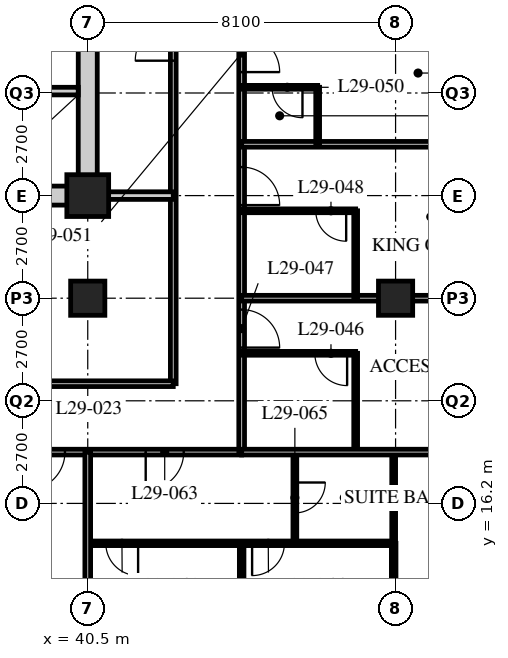
"""IFC4 building model, lengths in metres.
Left out: names, types, materials, properties, quantities, classifications, styles, units other than length and angle.
Written with IfcOpenShell. Run it as: python <this file> out.ifc"""

import sys

from ifc_helpers import new_model, si_unit, direction, frame, frame_2d, origin, origin_2d, place, context, subcontext, project, spatial, rectangle, hollow_rectangle, extrude, element, fill, save


model = new_model("IFC4")
c1 = context("Model", 3, precision=1e-05, world=origin(), true_north=direction((0.0, 1.0)))
c2 = subcontext(c1, "Body", "Model", "MODEL_VIEW")
j1 = project(units=[si_unit("LENGTHUNIT", "METRE"), si_unit("PLANEANGLEUNIT", "RADIAN")], contexts=[c1])
p1 = place(None, origin())
s1 = spatial("IfcSite", under=j1, at=p1, CompositionType="ELEMENT")
p2 = place(p1, origin())
s2 = spatial("IfcBuilding", under=s1, at=p2, CompositionType="ELEMENT")
p3 = place(p2, frame((0.0, 0.0, 117.0)))
s3 = spatial("IfcBuildingStorey", under=s2, at=p3, CompositionType="ELEMENT", Elevation=117.0)
p4 = place(p3, frame((40.5, 21.6, 0.0), z_axis=(0.0, 0.0, 1.0), x_axis=(1.0, 0.0, 0.0)))
e1 = element("IfcColumn", 1, at=p4, inside=s3, PredefinedType="COLUMN", context=c2, shape_type="SweptSolid", body=[
    extrude(hollow_rectangle(XDim=0.9, YDim=0.9, WallThickness=0.09, at=origin_2d()), origin(), (0.0, 0.0, 1.0), 3.4),
])
p5 = place(p3, frame((40.5, 24.3, 0.0), z_axis=(0.0, 0.0, 1.0), x_axis=(1.0, 0.0, 0.0)))
e2 = element("IfcColumn", 2, at=p5, inside=s3, PredefinedType="COLUMN", context=c2, shape_type="SweptSolid", body=[
    extrude(hollow_rectangle(XDim=1.1, YDim=1.1, WallThickness=0.1, at=origin_2d()), origin(), (0.0, 0.0, 1.0), 3.4),
])
p6 = place(p3, frame((48.6, 21.6, 0.0), z_axis=(0.0, 0.0, 1.0), x_axis=(1.0, 0.0, 0.0)))
e3 = element("IfcColumn", 3, at=p6, inside=s3, PredefinedType="COLUMN", context=c2, shape_type="SweptSolid", body=[
    extrude(hollow_rectangle(XDim=0.9, YDim=0.9, WallThickness=0.09, at=origin_2d()), origin(), (0.0, 0.0, 1.0), 3.4),
])
p7 = place(p3, frame((12.15, 17.55, 0.0), z_axis=(0.0, 0.0, 1.0), x_axis=(1.0, 0.0, 0.0)))
e4 = element("IfcWall", 4, at=p7, inside=s3, PredefinedType="PARTITIONING", context=c2, shape_type="SweptSolid", body=[
    extrude(rectangle(XDim=32.4, YDim=0.15, at=frame_2d((16.2, 0.0))), origin(), (0.0, 0.0, 1.0), 3.19),
])
p8 = place(p7, frame((5.95, 0.0, 0.0)))
e5 = element("IfcOpeningElement", 5, at=p8, cuts=e4, PredefinedType="OPENING", context=c2, shape_type="SweptSolid", body=[
    extrude(rectangle(XDim=1.0, YDim=2.1, at=frame_2d((0.5, 1.05))), frame((0.0, 0.085, 0.0), z_axis=(0.0, -1.0, 0.0), x_axis=(1.0, 0.0, 0.0)), (0.0, 0.0, 1.0), 0.17),
])
p9 = place(p7, frame((17.725, 0.0, 0.0)))
e6 = element("IfcOpeningElement", 6, at=p9, cuts=e4, PredefinedType="OPENING", context=c2, shape_type="SweptSolid", body=[
    extrude(rectangle(XDim=1.0, YDim=2.1, at=frame_2d((0.5, 1.05))), frame((0.0, 0.085, 0.0), z_axis=(0.0, -1.0, 0.0), x_axis=(1.0, 0.0, 0.0)), (0.0, 0.0, 1.0), 0.17),
])
p10 = place(p7, frame((26.75, 0.0, 0.0)))
e7 = element("IfcOpeningElement", 7, at=p10, cuts=e4, PredefinedType="OPENING", context=c2, shape_type="SweptSolid", body=[
    extrude(rectangle(XDim=1.0, YDim=2.1, at=frame_2d((0.5, 1.05))), frame((0.0, 0.085, 0.0), z_axis=(0.0, -1.0, 0.0), x_axis=(1.0, 0.0, 0.0)), (0.0, 0.0, 1.0), 0.17),
])
p11 = place(p7, frame((1.525, 0.0, 0.0)))
e8 = element("IfcOpeningElement", 8, at=p11, cuts=e4, PredefinedType="OPENING", context=c2, shape_type="SweptSolid", body=[
    extrude(rectangle(XDim=1.0, YDim=2.1, at=frame_2d((0.5, 1.05))), frame((0.0, 0.085, 0.0), z_axis=(0.0, -1.0, 0.0), x_axis=(1.0, 0.0, 0.0)), (0.0, 0.0, 1.0), 0.17),
])
p12 = place(p7, frame((29.875, 0.0, 0.0)))
e9 = element("IfcOpeningElement", 9, at=p12, cuts=e4, PredefinedType="OPENING", context=c2, shape_type="SweptSolid", body=[
    extrude(rectangle(XDim=1.0, YDim=2.1, at=frame_2d((0.5, 1.05))), frame((0.0, 0.085, 0.0), z_axis=(0.0, -1.0, 0.0), x_axis=(1.0, 0.0, 0.0)), (0.0, 0.0, 1.0), 0.17),
])
p13 = place(p3, frame((44.55, 17.55, 0.0), z_axis=(0.0, 0.0, 1.0), x_axis=(0.0, 1.0, 0.0)))
e10 = element("IfcWall", 10, at=p13, inside=s3, PredefinedType="PARTITIONING", context=c2, shape_type="SweptSolid", body=[
    extrude(rectangle(XDim=28.35, YDim=0.15, at=frame_2d((14.175, 0.0))), origin(), (0.0, 0.0, 1.0), 3.19),
])
p14 = place(p13, frame((2.75, 0.0, 0.0)))
e11 = element("IfcOpeningElement", 11, at=p14, cuts=e10, PredefinedType="OPENING", context=c2, shape_type="SweptSolid", body=[
    extrude(rectangle(XDim=1.0, YDim=2.1, at=frame_2d((0.5, 1.05))), frame((0.0, 0.085, 0.0), z_axis=(0.0, -1.0, 0.0), x_axis=(1.0, 0.0, 0.0)), (0.0, 0.0, 1.0), 0.17),
])
p15 = place(p13, frame((6.5, 0.0, 0.0)))
e12 = element("IfcOpeningElement", 12, at=p15, cuts=e10, PredefinedType="OPENING", context=c2, shape_type="SweptSolid", body=[
    extrude(rectangle(XDim=1.0, YDim=2.1, at=frame_2d((0.5, 1.05))), frame((0.0, 0.085, 0.0), z_axis=(0.0, -1.0, 0.0), x_axis=(1.0, 0.0, 0.0)), (0.0, 0.0, 1.0), 0.17),
])
p16 = place(p13, frame((10.0, 0.0, 0.0)))
e13 = element("IfcOpeningElement", 13, at=p16, cuts=e10, PredefinedType="OPENING", context=c2, shape_type="SweptSolid", body=[
    extrude(rectangle(XDim=1.0, YDim=2.1, at=frame_2d((0.5, 1.05))), frame((0.0, 0.085, 0.0), z_axis=(0.0, -1.0, 0.0), x_axis=(1.0, 0.0, 0.0)), (0.0, 0.0, 1.0), 0.17),
])
p17 = place(p13, frame((21.65, 0.0, 0.0)))
e14 = element("IfcOpeningElement", 14, at=p17, cuts=e10, PredefinedType="OPENING", context=c2, shape_type="SweptSolid", body=[
    extrude(rectangle(XDim=1.0, YDim=2.1, at=frame_2d((0.5, 1.05))), frame((0.0, 0.085, 0.0), z_axis=(0.0, -1.0, 0.0), x_axis=(1.0, 0.0, 0.0)), (0.0, 0.0, 1.0), 0.17),
])
p18 = place(p13, frame((26.75, 0.0, 0.0)))
e15 = element("IfcOpeningElement", 15, at=p18, cuts=e10, PredefinedType="OPENING", context=c2, shape_type="SweptSolid", body=[
    extrude(rectangle(XDim=1.0, YDim=2.1, at=frame_2d((0.5, 1.05))), frame((0.0, 0.085, 0.0), z_axis=(0.0, -1.0, 0.0), x_axis=(1.0, 0.0, 0.0)), (0.0, 0.0, 1.0), 0.17),
])
p19 = place(p3, frame((42.75, 19.35, 0.0), z_axis=(0.0, 0.0, 1.0), x_axis=(0.0, 1.0, 0.0)))
e16 = element("IfcWall", 16, at=p19, inside=s3, PredefinedType="PARTITIONING", context=c2, shape_type="SweptSolid", body=[
    extrude(rectangle(XDim=24.75, YDim=0.15, at=frame_2d((12.375, 0.0))), origin(), (0.0, 0.0, 1.0), 3.19),
])
p20 = place(p19, frame((8.5, 0.0, 0.0)))
e17 = element("IfcOpeningElement", 17, at=p20, cuts=e16, PredefinedType="OPENING", context=c2, shape_type="SweptSolid", body=[
    extrude(rectangle(XDim=1.0, YDim=2.1, at=frame_2d((0.5, 1.05))), frame((0.0, 0.085, 0.0), z_axis=(0.0, -1.0, 0.0), x_axis=(1.0, 0.0, 0.0)), (0.0, 0.0, 1.0), 0.17),
])
p21 = place(p19, frame((16.6, 0.0, 0.0)))
e18 = element("IfcOpeningElement", 18, at=p21, cuts=e16, PredefinedType="OPENING", context=c2, shape_type="SweptSolid", body=[
    extrude(rectangle(XDim=1.0, YDim=2.1, at=frame_2d((0.5, 1.05))), frame((0.0, 0.085, 0.0), z_axis=(0.0, -1.0, 0.0), x_axis=(1.0, 0.0, 0.0)), (0.0, 0.0, 1.0), 0.17),
])
p22 = place(p3, frame((29.56, 19.35, 0.0), z_axis=(0.0, 0.0, 1.0), x_axis=(1.0, 0.0, 0.0)))
e19 = element("IfcWall", 19, at=p22, inside=s3, PredefinedType="PARTITIONING", context=c2, shape_type="SweptSolid", body=[
    extrude(rectangle(XDim=13.19, YDim=0.15, at=frame_2d((6.595, 0.0))), origin(), (0.0, 0.0, 1.0), 3.19),
])
p23 = place(p22, frame((1.308, 0.0, 0.0)))
e20 = element("IfcOpeningElement", 20, at=p23, cuts=e19, PredefinedType="OPENING", context=c2, shape_type="SweptSolid", body=[
    extrude(rectangle(XDim=1.0, YDim=2.1, at=frame_2d((0.5, 1.05))), frame((0.0, 0.085, 0.0), z_axis=(0.0, -1.0, 0.0), x_axis=(1.0, 0.0, 0.0)), (0.0, 0.0, 1.0), 0.17),
])
p24 = place(p22, frame((7.908, 0.0, 0.0)))
e21 = element("IfcOpeningElement", 21, at=p24, cuts=e19, PredefinedType="OPENING", context=c2, shape_type="SweptSolid", body=[
    extrude(rectangle(XDim=1.0, YDim=2.1, at=frame_2d((0.5, 1.05))), frame((0.0, 0.085, 0.0), z_axis=(0.0, -1.0, 0.0), x_axis=(1.0, 0.0, 0.0)), (0.0, 0.0, 1.0), 0.17),
])
p25 = place(p3, frame((40.5, 24.3, 0.0), z_axis=(0.0, 0.0, 1.0), x_axis=(1.0, 0.0, 0.0)))
e22 = element("IfcWall", 22, at=p25, inside=s3, PredefinedType="SOLIDWALL", context=c2, shape_type="SweptSolid", body=[
    extrude(rectangle(XDim=2.25, YDim=0.2, at=frame_2d((1.125, 0.0))), origin(), (0.0, 0.0, 1.0), 3.19),
])
p26 = place(p3, frame((47.55, 17.55, 0.0), z_axis=(0.0, 0.0, 1.0), x_axis=(0.0, 1.0, 0.0)))
e23 = element("IfcWall", 23, at=p26, inside=s3, PredefinedType="PARTITIONING", context=c2, shape_type="SweptSolid", body=[
    extrude(rectangle(XDim=2.6, YDim=0.1, at=frame_2d((1.3, 0.0))), origin(), (0.0, 0.0, 1.0), 3.19),
])
p27 = place(p3, frame((44.55, 20.15, 0.0), z_axis=(0.0, 0.0, 1.0), x_axis=(1.0, 0.0, 0.0)))
e24 = element("IfcWall", 24, at=p27, inside=s3, PredefinedType="PARTITIONING", context=c2, shape_type="SweptSolid", body=[
    extrude(rectangle(XDim=3.0, YDim=0.1, at=frame_2d((1.5, 0.0))), origin(), (0.0, 0.0, 1.0), 3.19),
])
p28 = place(p27, frame((1.925, 0.0, 0.0)))
e25 = element("IfcOpeningElement", 25, at=p28, cuts=e24, PredefinedType="OPENING", context=c2, shape_type="SweptSolid", body=[
    extrude(rectangle(XDim=0.85, YDim=2.1, at=frame_2d((0.425, 1.05))), frame((0.0, 0.06, 0.0), z_axis=(0.0, -1.0, 0.0), x_axis=(1.0, 0.0, 0.0)), (0.0, 0.0, 1.0), 0.12),
])
p29 = place(p3, frame((44.55, 21.6, 0.0), z_axis=(0.0, 0.0, 1.0), x_axis=(1.0, 0.0, 0.0)))
e26 = element("IfcWall", 26, at=p29, inside=s3, PredefinedType="PARTITIONING", context=c2, shape_type="SweptSolid", body=[
    extrude(rectangle(XDim=11.85, YDim=0.15, at=frame_2d((5.925, 0.0))), origin(), (0.0, 0.0, 1.0), 2.578),
])
p30 = place(p3, frame((47.55, 21.6, 0.0), z_axis=(0.0, 0.0, 1.0), x_axis=(0.0, 1.0, 0.0)))
e27 = element("IfcWall", 27, at=p30, inside=s3, PredefinedType="PARTITIONING", context=c2, shape_type="SweptSolid", body=[
    extrude(rectangle(XDim=2.3, YDim=0.1, at=frame_2d((1.15, 0.0))), origin(), (0.0, 0.0, 1.0), 3.19),
])
p31 = place(p3, frame((44.55, 23.9, 0.0), z_axis=(0.0, 0.0, 1.0), x_axis=(1.0, 0.0, 0.0)))
e28 = element("IfcWall", 28, at=p31, inside=s3, PredefinedType="PARTITIONING", context=c2, shape_type="SweptSolid", body=[
    extrude(rectangle(XDim=3.0, YDim=0.1, at=frame_2d((1.5, 0.0))), origin(), (0.0, 0.0, 1.0), 3.19),
])
p32 = place(p31, frame((1.95, 0.0, 0.0)))
e29 = element("IfcOpeningElement", 29, at=p32, cuts=e28, PredefinedType="OPENING", context=c2, shape_type="SweptSolid", body=[
    extrude(rectangle(XDim=0.8, YDim=2.1, at=frame_2d((0.4, 1.05))), frame((0.0, 0.06, 0.0), z_axis=(0.0, -1.0, 0.0), x_axis=(1.0, 0.0, 0.0)), (0.0, 0.0, 1.0), 0.12),
])
p33 = place(p3, frame((44.55, 25.65, 0.0), z_axis=(0.0, 0.0, 1.0), x_axis=(1.0, 0.0, 0.0)))
e30 = element("IfcWall", 30, at=p33, inside=s3, PredefinedType="PARTITIONING", context=c2, shape_type="SweptSolid", body=[
    extrude(rectangle(XDim=11.85, YDim=0.15, at=frame_2d((5.925, 0.0))), origin(), (0.0, 0.0, 1.0), 3.19),
])
p34 = place(p3, frame((46.55, 25.65, 0.0), z_axis=(0.0, 0.0, 1.0), x_axis=(0.0, 1.0, 0.0)))
e31 = element("IfcWall", 31, at=p34, inside=s3, PredefinedType="PARTITIONING", context=c2, shape_type="SweptSolid", body=[
    extrude(rectangle(XDim=1.5, YDim=0.1, at=frame_2d((0.75, 0.0))), origin(), (0.0, 0.0, 1.0), 3.19),
])
p35 = place(p3, frame((44.55, 27.15, 0.0), z_axis=(0.0, 0.0, 1.0), x_axis=(1.0, 0.0, 0.0)))
e32 = element("IfcWall", 32, at=p35, inside=s3, PredefinedType="PARTITIONING", context=c2, shape_type="SweptSolid", body=[
    extrude(rectangle(XDim=2.0, YDim=0.1, at=frame_2d((1.0, 0.0))), origin(), (0.0, 0.0, 1.0), 3.19),
])
p36 = place(p35, frame((0.8, 0.0, 0.0)))
e33 = element("IfcOpeningElement", 33, at=p36, cuts=e32, PredefinedType="OPENING", context=c2, shape_type="SweptSolid", body=[
    extrude(rectangle(XDim=0.8, YDim=2.1, at=frame_2d((0.4, 1.05))), frame((0.0, 0.06, 0.0), z_axis=(0.0, -1.0, 0.0), x_axis=(1.0, 0.0, 0.0)), (0.0, 0.0, 1.0), 0.12),
])
p37 = place(p3, frame((40.5, 15.15, 0.0), z_axis=(0.0, 0.0, 1.0), x_axis=(1.0, 0.0, 0.0)))
e34 = element("IfcWall", 34, at=p37, inside=s3, PredefinedType="PARTITIONING", context=c2, shape_type="SweptSolid", body=[
    extrude(rectangle(XDim=8.05, YDim=0.12, at=frame_2d((4.025, 0.0))), origin(), (0.0, 0.0, 1.0), 3.19),
])
p38 = place(p37, frame((0.475, 0.0, 0.0)))
e35 = element("IfcOpeningElement", 35, at=p38, cuts=e34, PredefinedType="OPENING", context=c2, shape_type="SweptSolid", body=[
    extrude(rectangle(XDim=0.85, YDim=2.1, at=frame_2d((0.425, 1.05))), frame((0.0, 0.07, 0.0), z_axis=(0.0, -1.0, 0.0), x_axis=(1.0, 0.0, 0.0)), (0.0, 0.0, 1.0), 0.14),
])
p39 = place(p37, frame((4.325, 0.0, 0.0)))
e36 = element("IfcOpeningElement", 36, at=p39, cuts=e34, PredefinedType="OPENING", context=c2, shape_type="SweptSolid", body=[
    extrude(rectangle(XDim=0.85, YDim=2.1, at=frame_2d((0.425, 1.05))), frame((0.0, 0.07, 0.0), z_axis=(0.0, -1.0, 0.0), x_axis=(1.0, 0.0, 0.0)), (0.0, 0.0, 1.0), 0.14),
])
p40 = place(p3, frame((45.95, 17.55, 0.0), z_axis=(0.0, 0.0, 1.0), x_axis=(0.0, -1.0, 0.0)))
e37 = element("IfcWall", 37, at=p40, inside=s3, PredefinedType="PARTITIONING", context=c2, shape_type="SweptSolid", body=[
    extrude(rectangle(XDim=2.4, YDim=0.1, at=frame_2d((1.2, 0.0))), origin(), (0.0, 0.0, 1.0), 3.19),
])
p41 = place(p40, frame((0.8, 0.0, 0.0)))
e38 = element("IfcOpeningElement", 38, at=p41, cuts=e37, PredefinedType="OPENING", context=c2, shape_type="SweptSolid", body=[
    extrude(rectangle(XDim=0.8, YDim=2.1, at=frame_2d((0.4, 1.05))), frame((0.0, 0.06, 0.0), z_axis=(0.0, -1.0, 0.0), x_axis=(1.0, 0.0, 0.0)), (0.0, 0.0, 1.0), 0.12),
])
p42 = place(p3, frame((48.55, 17.55, 0.0), z_axis=(0.0, 0.0, 1.0), x_axis=(0.0, -1.0, 0.0)))
e39 = element("IfcWall", 39, at=p42, inside=s3, PredefinedType="PARTITIONING", context=c2, shape_type="SweptSolid", body=[
    extrude(rectangle(XDim=2.4, YDim=0.1, at=frame_2d((1.2, 0.0))), origin(), (0.0, 0.0, 1.0), 2.578),
])
p43 = place(p3, frame((44.55, 15.15, 0.0), z_axis=(0.0, 0.0, 1.0), x_axis=(0.0, -1.0, 0.0)))
e40 = element("IfcWall", 40, at=p43, inside=s3, PredefinedType="PARTITIONING", context=c2, shape_type="SweptSolid", body=[
    extrude(rectangle(XDim=9.45, YDim=0.12, at=frame_2d((4.725, 0.0))), origin(), (0.0, 0.0, 1.0), 3.19),
])
p44 = place(p3, frame((44.55, 17.55, 0.0), z_axis=(0.0, 0.0, 1.0), x_axis=(1.0, 0.0, 0.0)))
e41 = element("IfcWall", 41, at=p44, inside=s3, PredefinedType="PARTITIONING", context=c2, shape_type="SweptSolid", body=[
    extrude(rectangle(XDim=11.85, YDim=0.15, at=frame_2d((5.925, 0.0))), origin(), (0.0, 0.0, 1.0), 3.19),
])
p45 = place(p3, frame((40.5, 17.55, 0.0), z_axis=(0.0, 0.0, 1.0), x_axis=(0.0, -1.0, 0.0)))
e42 = element("IfcWall", 42, at=p45, inside=s3, PredefinedType="PARTITIONING", context=c2, shape_type="SweptSolid", body=[
    extrude(rectangle(XDim=11.85, YDim=0.15, at=frame_2d((5.925, 0.0))), origin(), (0.0, 0.0, 1.0), 2.578),
])
p46 = place(p3, frame((48.55, 15.15, 0.0), z_axis=(0.0, 0.0, 1.0), x_axis=(0.0, -1.0, 0.0)))
e43 = element("IfcWall", 43, at=p46, inside=s3, PredefinedType="PARTITIONING", context=c2, shape_type="SweptSolid", body=[
    extrude(rectangle(XDim=1.2, YDim=0.12, at=frame_2d((0.6, 0.0))), origin(), (0.0, 0.0, 1.0), 2.578),
])
p47 = place(p3, frame((15.95, 24.3, 0.0), z_axis=(0.0, 0.0, 1.0), x_axis=(1.0, 0.0, 0.0)))
e44 = element("IfcWall", 44, at=p47, inside=s3, PredefinedType="SOLIDWALL", context=c2, shape_type="SweptSolid", body=[
    extrude(rectangle(XDim=24.8, YDim=0.5, at=frame_2d((12.4, 0.0))), origin(), (0.0, 0.0, 1.0), 2.54),
])
p48 = place(p47, frame((11.5, 0.0, 0.0)))
e45 = element("IfcOpeningElement", 45, at=p48, cuts=e44, PredefinedType="OPENING", context=c2, shape_type="SweptSolid", body=[
    extrude(rectangle(XDim=1.8, YDim=2.4, at=frame_2d((0.9, 1.2))), frame((0.0, 0.26, 0.0), z_axis=(0.0, -1.0, 0.0), x_axis=(1.0, 0.0, 0.0)), (0.0, 0.0, 1.0), 0.52),
])
p49 = place(p3, frame((40.5, 24.55, 0.0), z_axis=(0.0, 0.0, 1.0), x_axis=(0.0, 1.0, 0.0)))
e46 = element("IfcWall", 46, at=p49, inside=s3, PredefinedType="SOLIDWALL", context=c2, shape_type="SweptSolid", body=[
    extrude(rectangle(XDim=15.7, YDim=0.5, at=frame_2d((7.85, 0.0))), origin(), (0.0, 0.0, 1.0), 2.578),
])
p50 = place(p3, frame((37.65, 27.05, 0.0), z_axis=(0.0, 0.0, 1.0), x_axis=(1.0, 0.0, 0.0)))
e47 = element("IfcWall", 47, at=p50, inside=s3, PredefinedType="SOLIDWALL", context=c2, shape_type="SweptSolid", body=[
    extrude(rectangle(XDim=2.6, YDim=0.2, at=frame_2d((1.3, 0.0))), origin(), (0.0, 0.0, 1.0), 3.19),
])
p51 = place(p20, origin())
e48 = element("IfcDoor", 48, at=p51, inside=s3, OperationType="SINGLE_SWING_LEFT", PredefinedType="DOOR", context=c2, shape_type="SweptSolid", body=[
    extrude(rectangle(XDim=1.0, YDim=2.1, at=frame_2d((0.5, 1.05))), frame((0.0, 0.025, 0.0), z_axis=(0.0, -1.0, 0.0), x_axis=(1.0, 0.0, 0.0)), (0.0, 0.0, 1.0), 0.05),
])
fill(e17, e48)
p52 = place(p10, origin())
e49 = element("IfcDoor", 49, at=p52, inside=s3, OperationType="SINGLE_SWING_RIGHT", PredefinedType="DOOR", context=c2, shape_type="SweptSolid", body=[
    extrude(rectangle(XDim=1.0, YDim=2.1, at=frame_2d((0.5, 1.05))), frame((0.0, 0.025, 0.0), z_axis=(0.0, -1.0, 0.0), x_axis=(1.0, 0.0, 0.0)), (0.0, 0.0, 1.0), 0.05),
])
fill(e7, e49)
p53 = place(p28, origin())
e50 = element("IfcDoor", 50, at=p53, inside=s3, OperationType="SINGLE_SWING_LEFT", PredefinedType="DOOR", context=c2, shape_type="SweptSolid", body=[
    extrude(rectangle(XDim=0.85, YDim=2.1, at=frame_2d((0.425, 1.05))), frame((0.0, 0.025, 0.0), z_axis=(0.0, -1.0, 0.0), x_axis=(1.0, 0.0, 0.0)), (0.0, 0.0, 1.0), 0.05),
])
fill(e25, e50)
p54 = place(p14, origin())
e51 = element("IfcDoor", 51, at=p54, inside=s3, OperationType="SINGLE_SWING_RIGHT", PredefinedType="DOOR", context=c2, shape_type="SweptSolid", body=[
    extrude(rectangle(XDim=1.0, YDim=2.1, at=frame_2d((0.5, 1.05))), frame((0.0, 0.025, 0.0), z_axis=(0.0, -1.0, 0.0), x_axis=(1.0, 0.0, 0.0)), (0.0, 0.0, 1.0), 0.05),
])
fill(e11, e51)
p55 = place(p32, origin())
e52 = element("IfcDoor", 52, at=p55, inside=s3, OperationType="SINGLE_SWING_LEFT", PredefinedType="DOOR", context=c2, shape_type="SweptSolid", body=[
    extrude(rectangle(XDim=0.8, YDim=2.1, at=frame_2d((0.4, 1.05))), frame((0.0, 0.025, 0.0), z_axis=(0.0, -1.0, 0.0), x_axis=(1.0, 0.0, 0.0)), (0.0, 0.0, 1.0), 0.05),
])
fill(e29, e52)
p56 = place(p15, origin())
e53 = element("IfcDoor", 53, at=p56, inside=s3, OperationType="SINGLE_SWING_RIGHT", PredefinedType="DOOR", context=c2, shape_type="SweptSolid", body=[
    extrude(rectangle(XDim=1.0, YDim=2.1, at=frame_2d((0.5, 1.05))), frame((0.0, 0.025, 0.0), z_axis=(0.0, -1.0, 0.0), x_axis=(1.0, 0.0, 0.0)), (0.0, 0.0, 1.0), 0.05),
])
fill(e12, e53)
p57 = place(p36, origin())
e54 = element("IfcDoor", 54, at=p57, inside=s3, OperationType="SINGLE_SWING_LEFT", PredefinedType="DOOR", context=c2, shape_type="SweptSolid", body=[
    extrude(rectangle(XDim=0.8, YDim=2.1, at=frame_2d((0.4, 1.05))), frame((0.0, 0.025, 0.0), z_axis=(0.0, -1.0, 0.0), x_axis=(1.0, 0.0, 0.0)), (0.0, 0.0, 1.0), 0.05),
])
fill(e33, e54)
p58 = place(p16, origin())
e55 = element("IfcDoor", 55, at=p58, inside=s3, OperationType="SINGLE_SWING_RIGHT", PredefinedType="DOOR", context=c2, shape_type="SweptSolid", body=[
    extrude(rectangle(XDim=1.0, YDim=2.1, at=frame_2d((0.5, 1.05))), frame((0.0, 0.025, 0.0), z_axis=(0.0, -1.0, 0.0), x_axis=(1.0, 0.0, 0.0)), (0.0, 0.0, 1.0), 0.05),
])
fill(e13, e55)
p59 = place(p12, origin())
e56 = element("IfcDoor", 56, at=p59, inside=s3, OperationType="SINGLE_SWING_RIGHT", PredefinedType="DOOR", context=c2, shape_type="SweptSolid", body=[
    extrude(rectangle(XDim=1.0, YDim=2.1, at=frame_2d((0.5, 1.05))), frame((0.0, 0.025, 0.0), z_axis=(0.0, -1.0, 0.0), x_axis=(1.0, 0.0, 0.0)), (0.0, 0.0, 1.0), 0.05),
])
fill(e9, e56)
p60 = place(p38, origin())
e57 = element("IfcDoor", 57, at=p60, inside=s3, OperationType="SINGLE_SWING_LEFT", PredefinedType="DOOR", context=c2, shape_type="SweptSolid", body=[
    extrude(rectangle(XDim=0.85, YDim=2.1, at=frame_2d((0.425, 1.05))), frame((0.0, 0.025, 0.0), z_axis=(0.0, -1.0, 0.0), x_axis=(1.0, 0.0, 0.0)), (0.0, 0.0, 1.0), 0.05),
])
fill(e35, e57)
p61 = place(p41, origin())
e58 = element("IfcDoor", 58, at=p61, inside=s3, OperationType="SINGLE_SWING_LEFT", PredefinedType="DOOR", context=c2, shape_type="SweptSolid", body=[
    extrude(rectangle(XDim=0.8, YDim=2.1, at=frame_2d((0.4, 1.05))), frame((0.0, 0.025, 0.0), z_axis=(0.0, -1.0, 0.0), x_axis=(1.0, 0.0, 0.0)), (0.0, 0.0, 1.0), 0.05),
])
fill(e38, e58)
p62 = place(p39, origin())
e59 = element("IfcDoor", 59, at=p62, inside=s3, OperationType="SINGLE_SWING_RIGHT", PredefinedType="DOOR", context=c2, shape_type="SweptSolid", body=[
    extrude(rectangle(XDim=0.85, YDim=2.1, at=frame_2d((0.425, 1.05))), frame((0.0, 0.025, 0.0), z_axis=(0.0, -1.0, 0.0), x_axis=(1.0, 0.0, 0.0)), (0.0, 0.0, 1.0), 0.05),
])
fill(e36, e59)
save(model, sys.argv[1])
